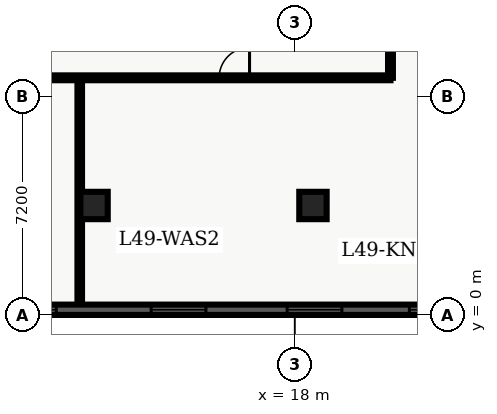
"""IFC4 building model, lengths in metres.
Left out: names, types, materials, properties, quantities, classifications, styles, units other than length and angle.
Written with IfcOpenShell. Run it as: python <this file> out.ifc"""

import sys

from ifc_helpers import new_model, entity, si_unit, converted_unit, direction, frame, origin_with_axes, origin_2d_with_axis, place, context, subcontext, project, spatial, polyline, rectangle, outline, extrude, element, fill, save


model = new_model("IFC4")
c1 = context("Model", 3, precision=1e-05, world=origin_with_axes(), true_north=direction((0.0, 1.0)))
c2 = subcontext(c1, "Body", "Model", "MODEL_VIEW")
j1 = project(units=[si_unit("LENGTHUNIT", "METRE"), converted_unit("PLANEANGLEUNIT", "DEGREE", entity("IfcPlaneAngleMeasure", 0.017), si_unit("PLANEANGLEUNIT", "RADIAN"), dimensions=[0, 0, 0, 0, 0, 0, 0])], contexts=[c1])
p1 = place(None, origin_with_axes())
s1 = spatial("IfcSite", under=j1, at=p1, CompositionType="ELEMENT")
p2 = place(p1, origin_with_axes())
s2 = spatial("IfcBuilding", under=s1, at=p2, CompositionType="ELEMENT")
p3 = place(p2, frame((0.0, 0.0, 200.4), z_axis=(0.0, 0.0, 1.0), x_axis=(1.0, 0.0, 0.0)))
s3 = spatial("IfcBuildingStorey", under=s2, at=p3, CompositionType="ELEMENT", Elevation=200.4)
for number, where, z_axis, x_axis in (
    (1, (11.4, 3.6, 0.0), (0.0, 0.0, 1.0), (1.0, 0.0, 0.0)),
    (2, (18.6, 3.6, 0.0), (0.0, 0.0, 1.0), (1.0, 0.0, 0.0)),
):
    element("IfcColumn", number, at=place(p3, frame(where, z_axis=z_axis, x_axis=x_axis)), inside=s3, PredefinedType="COLUMN", context=c2, shape_type="SweptSolid", body=[
        extrude(rectangle(XDim=0.9, YDim=0.9, at=origin_2d_with_axis()), origin_with_axes(), (0.0, 0.0, 1.0), 3.9),
    ])
p4 = place(p3, frame((2.6, 7.8, 0.0), z_axis=(0.0, 0.0, 1.0), x_axis=(1.0, 0.0, 0.0)))
e3 = element("IfcWall", 3, at=p4, inside=s3, PredefinedType="PARTITIONING", context=c2, shape_type="SweptSolid", body=[
    extrude(outline(polyline([(0.0, -0.08), (18.55, -0.08), (18.55, 0.08), (0.0, 0.08), (0.0, -0.08)])), origin_with_axes(), (0.0, 0.0, 1.0), 2.7),
])
p5 = place(p4, frame((5.04, 0.0, 0.0), z_axis=(0.0, 0.0, 1.0), x_axis=(1.0, 0.0, 0.0)))
e4 = element("IfcOpeningElement", 4, at=p5, cuts=e3, PredefinedType="OPENING", context=c2, shape_type="SweptSolid", body=[
    extrude(rectangle(XDim=1.2, YDim=0.18, at=origin_2d_with_axis()), origin_with_axes(), (0.0, 0.0, 1.0), 2.2),
])
p6 = place(p4, frame((13.415, 0.0, 0.0), z_axis=(0.0, 0.0, 1.0), x_axis=(1.0, 0.0, 0.0)))
e5 = element("IfcOpeningElement", 5, at=p6, cuts=e3, PredefinedType="OPENING", context=c2, shape_type="SweptSolid", body=[
    extrude(rectangle(XDim=1.0, YDim=0.18, at=origin_2d_with_axis()), origin_with_axes(), (0.0, 0.0, 1.0), 2.15),
])
p7 = place(p3, frame((21.15, 7.8, 0.0), z_axis=(0.0, 0.0, 1.0), x_axis=(0.0, 1.0, 0.0)))
e6 = element("IfcWall", 6, at=p7, inside=s3, PredefinedType="PARTITIONING", context=c2, shape_type="SweptSolid", body=[
    extrude(outline(polyline([(0.0, -0.08), (32.7, -0.08), (32.7, 0.08), (0.0, 0.08), (0.0, -0.08)])), origin_with_axes(), (0.0, 0.0, 1.0), 2.7),
])
p8 = place(p7, frame((15.589, 0.0, 0.0), z_axis=(0.0, 0.0, 1.0), x_axis=(1.0, 0.0, 0.0)))
e7 = element("IfcOpeningElement", 7, at=p8, cuts=e6, PredefinedType="OPENING", context=c2, shape_type="SweptSolid", body=[
    extrude(rectangle(XDim=1.0, YDim=0.18, at=origin_2d_with_axis()), origin_with_axes(), (0.0, 0.0, 1.0), 2.15),
])
p9 = place(p7, frame((19.026, 0.0, 0.0), z_axis=(0.0, 0.0, 1.0), x_axis=(1.0, 0.0, 0.0)))
e8 = element("IfcOpeningElement", 8, at=p9, cuts=e6, PredefinedType="OPENING", context=c2, shape_type="SweptSolid", body=[
    extrude(rectangle(XDim=1.0, YDim=0.18, at=origin_2d_with_axis()), origin_with_axes(), (0.0, 0.0, 1.0), 2.15),
])
p10 = place(p7, frame((22.849, 0.0, 0.0), z_axis=(0.0, 0.0, 1.0), x_axis=(1.0, 0.0, 0.0)))
e9 = element("IfcOpeningElement", 9, at=p10, cuts=e6, PredefinedType="OPENING", context=c2, shape_type="SweptSolid", body=[
    extrude(rectangle(XDim=1.0, YDim=0.18, at=origin_2d_with_axis()), origin_with_axes(), (0.0, 0.0, 1.0), 2.15),
])
p11 = place(p7, frame((27.204, 0.0, 0.0), z_axis=(0.0, 0.0, 1.0), x_axis=(1.0, 0.0, 0.0)))
e10 = element("IfcOpeningElement", 10, at=p11, cuts=e6, PredefinedType="OPENING", context=c2, shape_type="SweptSolid", body=[
    extrude(rectangle(XDim=1.0, YDim=0.18, at=origin_2d_with_axis()), origin_with_axes(), (0.0, 0.0, 1.0), 2.15),
])
p12 = place(p7, frame((31.042, 0.0, 0.0), z_axis=(0.0, 0.0, 1.0), x_axis=(1.0, 0.0, 0.0)))
e11 = element("IfcOpeningElement", 11, at=p12, cuts=e6, PredefinedType="OPENING", context=c2, shape_type="SweptSolid", body=[
    extrude(rectangle(XDim=1.0, YDim=0.18, at=origin_2d_with_axis()), origin_with_axes(), (0.0, 0.0, 1.0), 2.15),
])
p13 = place(p7, frame((5.775, 0.0, 0.0), z_axis=(0.0, 0.0, 1.0), x_axis=(1.0, 0.0, 0.0)))
e12 = element("IfcOpeningElement", 12, at=p13, cuts=e6, PredefinedType="OPENING", context=c2, shape_type="SweptSolid", body=[
    extrude(rectangle(XDim=1.05, YDim=0.18, at=origin_2d_with_axis()), origin_with_axes(), (0.0, 0.0, 1.0), 2.15),
])
p14 = place(p3, frame((10.929, 0.335, 0.0), z_axis=(0.0, 0.0, 1.0), x_axis=(0.0, 1.0, 0.0)))
e13 = element("IfcWall", 13, at=p14, inside=s3, PredefinedType="PARTITIONING", context=c2, shape_type="SweptSolid", body=[
    extrude(outline(polyline([(0.0, -0.075), (7.365, -0.075), (7.365, 0.075), (0.0, 0.075), (0.0, -0.075)])), origin_with_axes(), (0.0, 0.0, 1.0), 2.7),
])
p15 = place(p3, frame((57.26, 0.17, 0.0), z_axis=(0.0, 0.0, 1.0), x_axis=(-1.0, 0.0, 0.0)))
e14 = element("IfcWall", 14, at=p15, inside=s3, PredefinedType="SOLIDWALL", context=c2, shape_type="SweptSolid", body=[
    extrude(outline(polyline([(0.0, -0.17), (54.86, -0.17), (54.86, 0.17), (0.0, 0.17), (0.0, -0.17)])), origin_with_axes(), (0.0, 0.0, 1.0), 3.66),
])
p16 = place(p15, frame((2.836, 0.0, 0.45), z_axis=(0.0, 0.0, 1.0), x_axis=(1.0, 0.0, 0.0)))
e15 = element("IfcOpeningElement", 15, at=p16, cuts=e14, PredefinedType="OPENING", context=c2, shape_type="SweptSolid", body=[
    extrude(rectangle(XDim=1.8, YDim=0.36, at=origin_2d_with_axis()), origin_with_axes(), (0.0, 0.0, 1.0), 2.1),
])
p17 = place(p15, frame((7.307, 0.0, 0.45), z_axis=(0.0, 0.0, 1.0), x_axis=(1.0, 0.0, 0.0)))
e16 = element("IfcOpeningElement", 16, at=p17, cuts=e14, PredefinedType="OPENING", context=c2, shape_type="SweptSolid", body=[
    extrude(rectangle(XDim=1.8, YDim=0.36, at=origin_2d_with_axis()), origin_with_axes(), (0.0, 0.0, 1.0), 2.1),
])
p18 = place(p15, frame((11.779, 0.0, 0.45), z_axis=(0.0, 0.0, 1.0), x_axis=(1.0, 0.0, 0.0)))
e17 = element("IfcOpeningElement", 17, at=p18, cuts=e14, PredefinedType="OPENING", context=c2, shape_type="SweptSolid", body=[
    extrude(rectangle(XDim=1.8, YDim=0.36, at=origin_2d_with_axis()), origin_with_axes(), (0.0, 0.0, 1.0), 2.1),
])
p19 = place(p15, frame((16.251, 0.0, 0.45), z_axis=(0.0, 0.0, 1.0), x_axis=(1.0, 0.0, 0.0)))
e18 = element("IfcOpeningElement", 18, at=p19, cuts=e14, PredefinedType="OPENING", context=c2, shape_type="SweptSolid", body=[
    extrude(rectangle(XDim=1.8, YDim=0.36, at=origin_2d_with_axis()), origin_with_axes(), (0.0, 0.0, 1.0), 2.1),
])
p20 = place(p15, frame((20.723, 0.0, 0.45), z_axis=(0.0, 0.0, 1.0), x_axis=(1.0, 0.0, 0.0)))
e19 = element("IfcOpeningElement", 19, at=p20, cuts=e14, PredefinedType="OPENING", context=c2, shape_type="SweptSolid", body=[
    extrude(rectangle(XDim=1.8, YDim=0.36, at=origin_2d_with_axis()), origin_with_axes(), (0.0, 0.0, 1.0), 2.1),
])
p21 = place(p15, frame((34.588, 0.0, 0.45), z_axis=(0.0, 0.0, 1.0), x_axis=(1.0, 0.0, 0.0)))
e20 = element("IfcOpeningElement", 20, at=p21, cuts=e14, PredefinedType="OPENING", context=c2, shape_type="SweptSolid", body=[
    extrude(rectangle(XDim=1.8, YDim=0.36, at=origin_2d_with_axis()), origin_with_axes(), (0.0, 0.0, 1.0), 2.1),
])
p22 = place(p15, frame((38.609, 0.0, 0.45), z_axis=(0.0, 0.0, 1.0), x_axis=(1.0, 0.0, 0.0)))
e21 = element("IfcOpeningElement", 21, at=p22, cuts=e14, PredefinedType="OPENING", context=c2, shape_type="SweptSolid", body=[
    extrude(rectangle(XDim=1.8, YDim=0.36, at=origin_2d_with_axis()), origin_with_axes(), (0.0, 0.0, 1.0), 2.1),
])
p23 = place(p15, frame((43.081, 0.0, 0.45), z_axis=(0.0, 0.0, 1.0), x_axis=(1.0, 0.0, 0.0)))
e22 = element("IfcOpeningElement", 22, at=p23, cuts=e14, PredefinedType="OPENING", context=c2, shape_type="SweptSolid", body=[
    extrude(rectangle(XDim=1.8, YDim=0.36, at=origin_2d_with_axis()), origin_with_axes(), (0.0, 0.0, 1.0), 2.1),
])
p24 = place(p15, frame((48.003, 0.0, 0.45), z_axis=(0.0, 0.0, 1.0), x_axis=(1.0, 0.0, 0.0)))
e23 = element("IfcOpeningElement", 23, at=p24, cuts=e14, PredefinedType="OPENING", context=c2, shape_type="SweptSolid", body=[
    extrude(rectangle(XDim=1.8, YDim=0.36, at=origin_2d_with_axis()), origin_with_axes(), (0.0, 0.0, 1.0), 2.1),
])
p25 = place(p15, frame((52.024, 0.0, 0.45), z_axis=(0.0, 0.0, 1.0), x_axis=(1.0, 0.0, 0.0)))
e24 = element("IfcOpeningElement", 24, at=p25, cuts=e14, PredefinedType="OPENING", context=c2, shape_type="SweptSolid", body=[
    extrude(rectangle(XDim=1.8, YDim=0.36, at=origin_2d_with_axis()), origin_with_axes(), (0.0, 0.0, 1.0), 2.1),
])
p26 = place(p4, frame((13.415, 0.0, 0.0), z_axis=(0.0, 0.0, 1.0), x_axis=(1.0, 0.0, 0.0)))
e25 = element("IfcDoor", 25, at=p26, inside=s3, OperationType="SINGLE_SWING_RIGHT", PredefinedType="DOOR", context=c2, shape_type="SweptSolid", body=[
    extrude(rectangle(XDim=1.0, YDim=0.09, at=origin_2d_with_axis()), origin_with_axes(), (0.0, 0.0, 1.0), 2.15),
])
fill(e5, e25)
p27 = place(p15, frame((34.588, 0.0, 0.45), z_axis=(0.0, 0.0, 1.0), x_axis=(1.0, 0.0, 0.0)))
e26 = element("IfcWindow", 26, at=p27, inside=s3, PredefinedType="WINDOW", context=c2, shape_type="SweptSolid", body=[
    extrude(rectangle(XDim=1.8, YDim=0.09, at=origin_2d_with_axis()), origin_with_axes(), (0.0, 0.0, 1.0), 2.1),
])
fill(e20, e26)
p28 = place(p15, frame((38.609, 0.0, 0.45), z_axis=(0.0, 0.0, 1.0), x_axis=(1.0, 0.0, 0.0)))
e27 = element("IfcWindow", 27, at=p28, inside=s3, PredefinedType="WINDOW", context=c2, shape_type="SweptSolid", body=[
    extrude(rectangle(XDim=1.8, YDim=0.09, at=origin_2d_with_axis()), origin_with_axes(), (0.0, 0.0, 1.0), 2.1),
])
fill(e21, e27)
p29 = place(p15, frame((43.081, 0.0, 0.45), z_axis=(0.0, 0.0, 1.0), x_axis=(1.0, 0.0, 0.0)))
e28 = element("IfcWindow", 28, at=p29, inside=s3, PredefinedType="WINDOW", context=c2, shape_type="SweptSolid", body=[
    extrude(rectangle(XDim=1.8, YDim=0.09, at=origin_2d_with_axis()), origin_with_axes(), (0.0, 0.0, 1.0), 2.1),
])
fill(e22, e28)
p30 = place(p15, frame((48.003, 0.0, 0.45), z_axis=(0.0, 0.0, 1.0), x_axis=(1.0, 0.0, 0.0)))
e29 = element("IfcWindow", 29, at=p30, inside=s3, PredefinedType="WINDOW", context=c2, shape_type="SweptSolid", body=[
    extrude(rectangle(XDim=1.8, YDim=0.09, at=origin_2d_with_axis()), origin_with_axes(), (0.0, 0.0, 1.0), 2.1),
])
fill(e23, e29)
save(model, sys.argv[1])
